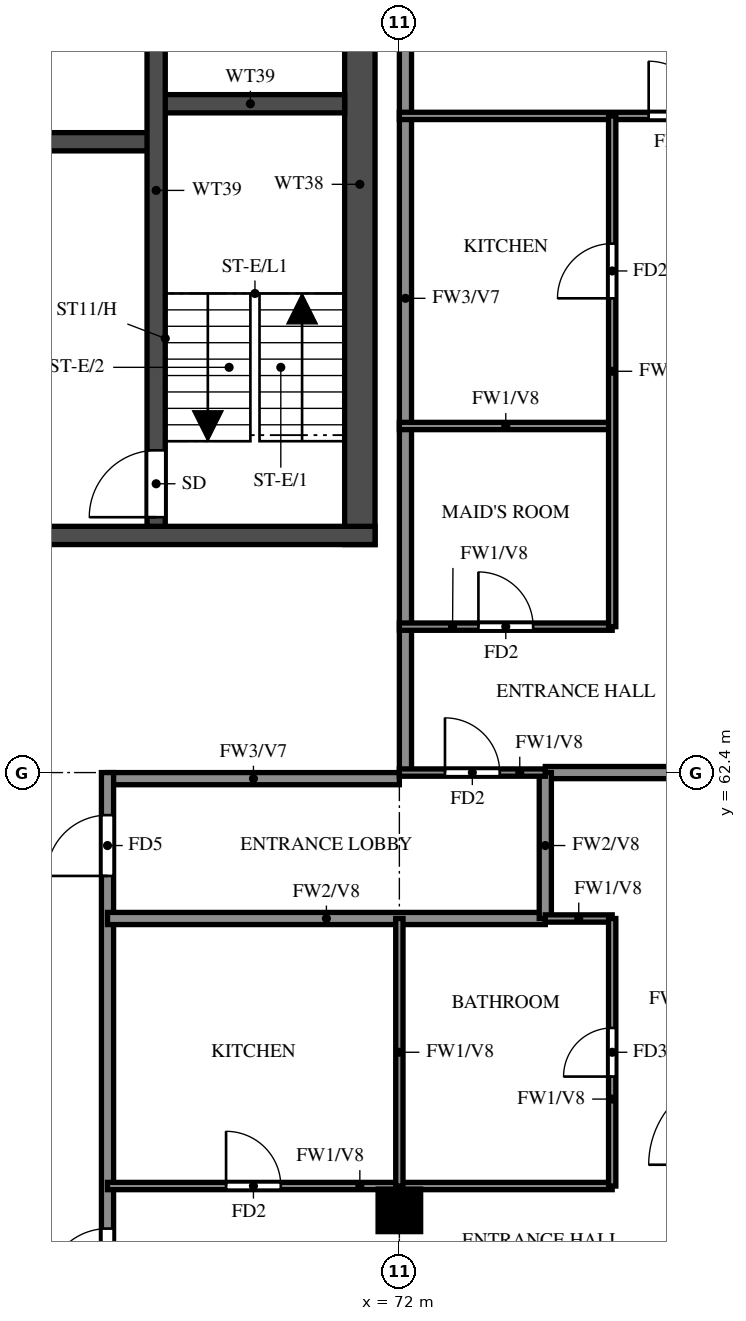
"""IFC4 building model, lengths in metres.
Left out: names, types, materials, properties, quantities, classifications, styles, units other than length and angle.
Written with IfcOpenShell. Run it as: python <this file> out.ifc"""

import sys

from ifc_helpers import new_model, si_unit, direction, frame, frame_2d, origin, origin_2d, place, context, subcontext, project, spatial, rectangle, extrude, source, transform, mapped, element, fill, save


model = new_model("IFC4")
c1 = context("Model", 3, precision=1e-05, world=origin(), true_north=direction((0.0, 1.0)))
c2 = subcontext(c1, "Body", "Model", "MODEL_VIEW")
j1 = project(units=[si_unit("LENGTHUNIT", "METRE"), si_unit("PLANEANGLEUNIT", "RADIAN")], contexts=[c1])
p1 = place(None, origin())
s1 = spatial("IfcSite", under=j1, at=p1, CompositionType="ELEMENT")
p2 = place(p1, origin())
s2 = spatial("IfcBuilding", under=s1, at=p2, CompositionType="ELEMENT")
p3 = place(p2, frame((0.0, 0.0, 267.5)))
s3 = spatial("IfcBuildingStorey", under=s2, at=p3, CompositionType="ELEMENT", Elevation=267.5)
m1 = source(origin(), c2, "Body", "SweptSolid", [
    extrude(rectangle(XDim=0.7, YDim=0.7, at=origin_2d()), origin(), (0.0, 0.0, 1.0), 3.099),
])
p4 = place(p3, frame((72.0, 55.2, 0.0), z_axis=(0.0, 0.0, 1.0), x_axis=(1.0, 0.0, 0.0)))
e1 = element("IfcColumn", 1, at=p4, inside=s3, PredefinedType="COLUMN", context=c2, shape_type="MappedRepresentation", body=[
    mapped(m1, transform((0.0, 0.0, 0.0))),
])
p5 = place(p3, frame((71.35, 66.15, 0.0), z_axis=(0.0, 0.0, 1.0), x_axis=(0.0, 1.0, 0.0)))
e2 = element("IfcWall", 2, at=p5, inside=s3, PredefinedType="SHEAR", context=c2, shape_type="SweptSolid", body=[
    extrude(rectangle(XDim=11.85, YDim=0.5, at=frame_2d((5.925, 0.0))), origin(), (0.0, 0.0, 1.0), 3.099),
])
p6 = place(p3, frame((29.2, 66.3, 0.0), z_axis=(0.0, 0.0, 1.0), x_axis=(1.0, 0.0, 0.0)))
e3 = element("IfcWall", 3, at=p6, inside=s3, PredefinedType="SHEAR", context=c2, shape_type="SweptSolid", body=[
    extrude(rectangle(XDim=42.4, YDim=0.3, at=frame_2d((21.2, 0.0))), origin(), (0.0, 0.0, 1.0), 3.099),
])
p7 = place(p6, frame((1.425, 0.0, 0.0)))
e4 = element("IfcOpeningElement", 4, at=p7, cuts=e3, PredefinedType="OPENING", context=c2, shape_type="SweptSolid", body=[
    extrude(rectangle(XDim=1.1, YDim=2.1, at=frame_2d((0.55, 1.05))), frame((0.0, 0.16, 0.0), z_axis=(0.0, -1.0, 0.0), x_axis=(1.0, 0.0, 0.0)), (0.0, 0.0, 1.0), 0.32),
])
p8 = place(p6, frame((4.2, 0.0, 0.0)))
e5 = element("IfcOpeningElement", 5, at=p8, cuts=e3, PredefinedType="OPENING", context=c2, shape_type="SweptSolid", body=[
    extrude(rectangle(XDim=1.8, YDim=2.1, at=frame_2d((0.9, 1.05))), frame((0.0, 0.16, 0.0), z_axis=(0.0, -1.0, 0.0), x_axis=(1.0, 0.0, 0.0)), (0.0, 0.0, 1.0), 0.32),
])
p9 = place(p3, frame((32.8, 72.775, 0.0), z_axis=(0.0, 0.0, 1.0), x_axis=(1.0, 0.0, 0.0)))
e6 = element("IfcWall", 6, at=p9, inside=s3, PredefinedType="SHEAR", context=c2, shape_type="SweptSolid", body=[
    extrude(rectangle(XDim=35.2, YDim=0.3, at=frame_2d((17.6, 0.0))), origin(), (0.0, 0.0, 1.0), 3.099),
])
p10 = place(p9, frame((19.8, 0.0, 0.0)))
e7 = element("IfcOpeningElement", 7, at=p10, cuts=e6, PredefinedType="OPENING", context=c2, shape_type="SweptSolid", body=[
    extrude(rectangle(XDim=1.1, YDim=2.1, at=frame_2d((0.55, 1.05))), frame((0.0, 0.16, 0.0), z_axis=(0.0, -1.0, 0.0), x_axis=(1.0, 0.0, 0.0)), (0.0, 0.0, 1.0), 0.32),
])
p11 = place(p9, frame((27.725, 0.0, 0.0)))
e8 = element("IfcOpeningElement", 8, at=p11, cuts=e6, PredefinedType="OPENING", context=c2, shape_type="SweptSolid", body=[
    extrude(rectangle(XDim=1.1, YDim=2.1, at=frame_2d((0.55, 1.05))), frame((0.0, 0.16, 0.0), z_axis=(0.0, -1.0, 0.0), x_axis=(1.0, 0.0, 0.0)), (0.0, 0.0, 1.0), 0.32),
])
p12 = place(p9, frame((30.325, 0.0, 0.0)))
e9 = element("IfcOpeningElement", 9, at=p12, cuts=e6, PredefinedType="OPENING", context=c2, shape_type="SweptSolid", body=[
    extrude(rectangle(XDim=1.1, YDim=2.1, at=frame_2d((0.55, 1.05))), frame((0.0, 0.16, 0.0), z_axis=(0.0, -1.0, 0.0), x_axis=(1.0, 0.0, 0.0)), (0.0, 0.0, 1.0), 0.32),
])
p13 = place(p9, frame((3.825, 0.0, 0.0)))
e10 = element("IfcOpeningElement", 10, at=p13, cuts=e6, PredefinedType="OPENING", context=c2, shape_type="SweptSolid", body=[
    extrude(rectangle(XDim=1.1, YDim=2.1, at=frame_2d((0.55, 1.05))), frame((0.0, 0.16, 0.0), z_axis=(0.0, -1.0, 0.0), x_axis=(1.0, 0.0, 0.0)), (0.0, 0.0, 1.0), 0.32),
])
p14 = place(p9, frame((6.575, 0.0, 0.0)))
e11 = element("IfcOpeningElement", 11, at=p14, cuts=e6, PredefinedType="OPENING", context=c2, shape_type="SweptSolid", body=[
    extrude(rectangle(XDim=1.1, YDim=2.1, at=frame_2d((0.55, 1.05))), frame((0.0, 0.16, 0.0), z_axis=(0.0, -1.0, 0.0), x_axis=(1.0, 0.0, 0.0)), (0.0, 0.0, 1.0), 0.32),
])
p15 = place(p9, frame((9.325, 0.0, 0.0)))
e12 = element("IfcOpeningElement", 12, at=p15, cuts=e6, PredefinedType="OPENING", context=c2, shape_type="SweptSolid", body=[
    extrude(rectangle(XDim=1.1, YDim=2.1, at=frame_2d((0.55, 1.05))), frame((0.0, 0.16, 0.0), z_axis=(0.0, -1.0, 0.0), x_axis=(1.0, 0.0, 0.0)), (0.0, 0.0, 1.0), 0.32),
])
p16 = place(p9, frame((12.075, 0.0, 0.0)))
e13 = element("IfcOpeningElement", 13, at=p16, cuts=e6, PredefinedType="OPENING", context=c2, shape_type="SweptSolid", body=[
    extrude(rectangle(XDim=1.1, YDim=2.1, at=frame_2d((0.55, 1.05))), frame((0.0, 0.16, 0.0), z_axis=(0.0, -1.0, 0.0), x_axis=(1.0, 0.0, 0.0)), (0.0, 0.0, 1.0), 0.32),
])
p17 = place(p9, frame((14.825, 0.0, 0.0)))
e14 = element("IfcOpeningElement", 14, at=p17, cuts=e6, PredefinedType="OPENING", context=c2, shape_type="SweptSolid", body=[
    extrude(rectangle(XDim=1.1, YDim=2.1, at=frame_2d((0.55, 1.05))), frame((0.0, 0.16, 0.0), z_axis=(0.0, -1.0, 0.0), x_axis=(1.0, 0.0, 0.0)), (0.0, 0.0, 1.0), 0.32),
])
p18 = place(p9, frame((17.575, 0.0, 0.0)))
e15 = element("IfcOpeningElement", 15, at=p18, cuts=e6, PredefinedType="OPENING", context=c2, shape_type="SweptSolid", body=[
    extrude(rectangle(XDim=1.1, YDim=2.1, at=frame_2d((0.55, 1.05))), frame((0.0, 0.16, 0.0), z_axis=(0.0, -1.0, 0.0), x_axis=(1.0, 0.0, 0.0)), (0.0, 0.0, 1.0), 0.32),
])
p19 = place(p9, frame((0.95, 0.0, 0.0)))
e16 = element("IfcOpeningElement", 16, at=p19, cuts=e6, PredefinedType="OPENING", context=c2, shape_type="SweptSolid", body=[
    extrude(rectangle(XDim=1.1, YDim=2.1, at=frame_2d((0.55, 1.05))), frame((0.0, 0.16, 0.0), z_axis=(0.0, -1.0, 0.0), x_axis=(1.0, 0.0, 0.0)), (0.0, 0.0, 1.0), 0.32),
])
p20 = place(p3, frame((68.0, 73.4, 0.0), z_axis=(0.0, 0.0, 1.0), x_axis=(1.0, 0.0, 0.0)))
e17 = element("IfcWall", 17, at=p20, inside=s3, PredefinedType="SHEAR", context=c2, shape_type="SweptSolid", body=[
    extrude(rectangle(XDim=3.1, YDim=0.3, at=frame_2d((1.55, 0.0))), origin(), (0.0, 0.0, 1.0), 3.099),
])
p21 = place(p3, frame((68.0, 66.45, 0.0), z_axis=(0.0, 0.0, 1.0), x_axis=(0.0, 1.0, 0.0)))
e18 = element("IfcWall", 18, at=p21, inside=s3, PredefinedType="SHEAR", context=c2, shape_type="SweptSolid", body=[
    extrude(rectangle(XDim=11.05, YDim=0.3, at=frame_2d((5.525, 0.0))), origin(), (0.0, 0.0, 1.0), 3.099),
])
p22 = place(p21, frame((0.15, 0.0, 0.0)))
e19 = element("IfcOpeningElement", 19, at=p22, cuts=e18, PredefinedType="OPENING", context=c2, shape_type="SweptSolid", body=[
    extrude(rectangle(XDim=1.1, YDim=2.1, at=frame_2d((0.55, 1.05))), frame((0.0, 0.16, 0.0), z_axis=(0.0, -1.0, 0.0), x_axis=(1.0, 0.0, 0.0)), (0.0, 0.0, 1.0), 0.32),
])
p23 = place(p3, frame((67.2, 62.3, 0.0), z_axis=(0.0, 0.0, 1.0), x_axis=(1.0, 0.0, 0.0)))
e20 = element("IfcWall", 20, at=p23, inside=s3, PredefinedType="SOLIDWALL", context=c2, shape_type="SweptSolid", body=[
    extrude(rectangle(XDim=4.8, YDim=0.2, at=frame_2d((2.4, 0.0))), origin(), (0.0, 0.0, 1.0), 3.099),
])
p24 = place(p3, frame((67.2, 45.6, 0.0), z_axis=(0.0, 0.0, 1.0), x_axis=(0.0, 1.0, 0.0)))
e21 = element("IfcWall", 21, at=p24, inside=s3, PredefinedType="SOLIDWALL", context=c2, shape_type="SweptSolid", body=[
    extrude(rectangle(XDim=16.8, YDim=0.2, at=frame_2d((8.4, 0.0))), origin(), (0.0, 0.0, 1.0), 3.099),
])
p25 = place(p24, frame((8.3, 0.0, 0.0)))
e22 = element("IfcOpeningElement", 22, at=p25, cuts=e21, PredefinedType="OPENING", context=c2, shape_type="SweptSolid", body=[
    extrude(rectangle(XDim=1.0, YDim=2.1, at=frame_2d((0.5, 1.05))), frame((0.0, 0.11, 0.0), z_axis=(0.0, -1.0, 0.0), x_axis=(1.0, 0.0, 0.0)), (0.0, 0.0, 1.0), 0.22),
])
p26 = place(p24, frame((15.1, 0.0, 0.0)))
e23 = element("IfcOpeningElement", 23, at=p26, cuts=e21, PredefinedType="OPENING", context=c2, shape_type="SweptSolid", body=[
    extrude(rectangle(XDim=1.0, YDim=2.1, at=frame_2d((0.5, 1.05))), frame((0.0, 0.11, 0.0), z_axis=(0.0, -1.0, 0.0), x_axis=(1.0, 0.0, 0.0)), (0.0, 0.0, 1.0), 0.22),
])
p27 = place(p24, frame((0.7, 0.0, 0.0)))
e24 = element("IfcOpeningElement", 24, at=p27, cuts=e21, PredefinedType="OPENING", context=c2, shape_type="SweptSolid", body=[
    extrude(rectangle(XDim=1.0, YDim=2.1, at=frame_2d((0.5, 1.05))), frame((0.0, 0.11, 0.0), z_axis=(0.0, -1.0, 0.0), x_axis=(1.0, 0.0, 0.0)), (0.0, 0.0, 1.0), 0.22),
])
p28 = place(p3, frame((72.1, 62.4, 0.0), z_axis=(0.0, 0.0, 1.0), x_axis=(0.0, 1.0, 0.0)))
e25 = element("IfcWall", 25, at=p28, inside=s3, PredefinedType="SOLIDWALL", context=c2, shape_type="SweptSolid", body=[
    extrude(rectangle(XDim=15.6, YDim=0.2, at=frame_2d((7.8, 0.0))), origin(), (0.0, 0.0, 1.0), 3.099),
])
p29 = place(p3, frame((67.2, 60.0, 0.0), z_axis=(0.0, 0.0, 1.0), x_axis=(1.0, 0.0, 0.0)))
e26 = element("IfcWall", 26, at=p29, inside=s3, PredefinedType="SOLIDWALL", context=c2, shape_type="SweptSolid", body=[
    extrude(rectangle(XDim=7.2, YDim=0.2, at=frame_2d((3.6, 0.0))), origin(), (0.0, 0.0, 1.0), 3.099),
])
p30 = place(p3, frame((74.4, 62.4, 0.0), z_axis=(0.0, 0.0, 1.0), x_axis=(1.0, 0.0, 0.0)))
e27 = element("IfcWall", 27, at=p30, inside=s3, PredefinedType="SOLIDWALL", context=c2, shape_type="SweptSolid", body=[
    extrude(rectangle(XDim=7.875, YDim=0.2, at=frame_2d((3.938, 0.0))), origin(), (0.0, 0.0, 1.0), 3.099),
])
p31 = place(p3, frame((74.4, 60.0, 0.0), z_axis=(0.0, 0.0, 1.0), x_axis=(0.0, 1.0, 0.0)))
e28 = element("IfcWall", 28, at=p31, inside=s3, PredefinedType="SOLIDWALL", context=c2, shape_type="SweptSolid", body=[
    extrude(rectangle(XDim=2.4, YDim=0.2, at=frame_2d((1.2, 0.0))), origin(), (0.0, 0.0, 1.0), 3.099),
])
p32 = place(p3, frame((67.2, 55.6, 0.0), z_axis=(0.0, 0.0, 1.0), x_axis=(1.0, 0.0, 0.0)))
e29 = element("IfcWall", 29, at=p32, inside=s3, PredefinedType="PARTITIONING", context=c2, shape_type="SweptSolid", body=[
    extrude(rectangle(XDim=8.3, YDim=0.12, at=frame_2d((4.15, 0.0))), origin(), (0.0, 0.0, 1.0), 3.099),
])
p33 = place(p32, frame((1.95, 0.0, 0.0)))
e30 = element("IfcOpeningElement", 30, at=p33, cuts=e29, PredefinedType="OPENING", context=c2, shape_type="SweptSolid", body=[
    extrude(rectangle(XDim=0.9, YDim=2.1, at=frame_2d((0.45, 1.05))), frame((0.0, 0.07, 0.0), z_axis=(0.0, -1.0, 0.0), x_axis=(1.0, 0.0, 0.0)), (0.0, 0.0, 1.0), 0.14),
])
p34 = place(p3, frame((74.4, 60.0, 0.0), z_axis=(0.0, 0.0, 1.0), x_axis=(1.0, 0.0, 0.0)))
e31 = element("IfcWall", 31, at=p34, inside=s3, PredefinedType="PARTITIONING", context=c2, shape_type="SweptSolid", body=[
    extrude(rectangle(XDim=1.1, YDim=0.12, at=frame_2d((0.55, 0.0))), origin(), (0.0, 0.0, 1.0), 3.099),
])
p35 = place(p3, frame((72.0, 62.4, 0.0), z_axis=(0.0, 0.0, 1.0), x_axis=(1.0, 0.0, 0.0)))
e32 = element("IfcWall", 32, at=p35, inside=s3, PredefinedType="PARTITIONING", context=c2, shape_type="SweptSolid", body=[
    extrude(rectangle(XDim=2.4, YDim=0.12, at=frame_2d((1.2, 0.0))), origin(), (0.0, 0.0, 1.0), 3.099),
])
p36 = place(p35, frame((0.75, 0.0, 0.0)))
e33 = element("IfcOpeningElement", 33, at=p36, cuts=e32, PredefinedType="OPENING", context=c2, shape_type="SweptSolid", body=[
    extrude(rectangle(XDim=0.9, YDim=2.1, at=frame_2d((0.45, 1.05))), frame((0.0, 0.07, 0.0), z_axis=(0.0, -1.0, 0.0), x_axis=(1.0, 0.0, 0.0)), (0.0, 0.0, 1.0), 0.14),
])
p37 = place(p3, frame((72.0, 64.8, 0.0), z_axis=(0.0, 0.0, 1.0), x_axis=(1.0, 0.0, 0.0)))
e34 = element("IfcWall", 34, at=p37, inside=s3, PredefinedType="PARTITIONING", context=c2, shape_type="SweptSolid", body=[
    extrude(rectangle(XDim=3.5, YDim=0.12, at=frame_2d((1.75, 0.0))), origin(), (0.0, 0.0, 1.0), 3.099),
])
p38 = place(p37, frame((1.3, 0.0, 0.0)))
e35 = element("IfcOpeningElement", 35, at=p38, cuts=e34, PredefinedType="OPENING", context=c2, shape_type="SweptSolid", body=[
    extrude(rectangle(XDim=0.9, YDim=2.1, at=frame_2d((0.45, 1.05))), frame((0.0, 0.07, 0.0), z_axis=(0.0, -1.0, 0.0), x_axis=(1.0, 0.0, 0.0)), (0.0, 0.0, 1.0), 0.14),
])
p39 = place(p3, frame((72.0, 68.1, 0.0), z_axis=(0.0, 0.0, 1.0), x_axis=(1.0, 0.0, 0.0)))
e36 = element("IfcWall", 36, at=p39, inside=s3, PredefinedType="PARTITIONING", context=c2, shape_type="SweptSolid", body=[
    extrude(rectangle(XDim=3.5, YDim=0.12, at=frame_2d((1.75, 0.0))), origin(), (0.0, 0.0, 1.0), 3.099),
])
p40 = place(p3, frame((72.0, 73.2, 0.0), z_axis=(0.0, 0.0, 1.0), x_axis=(1.0, 0.0, 0.0)))
e37 = element("IfcWall", 37, at=p40, inside=s3, PredefinedType="PARTITIONING", context=c2, shape_type="SweptSolid", body=[
    extrude(rectangle(XDim=10.275, YDim=0.12, at=frame_2d((5.137, 0.0))), origin(), (0.0, 0.0, 1.0), 3.099),
])
p41 = place(p40, frame((4.1, 0.0, 0.0)))
e38 = element("IfcOpeningElement", 38, at=p41, cuts=e37, PredefinedType="OPENING", context=c2, shape_type="SweptSolid", body=[
    extrude(rectangle(XDim=0.9, YDim=2.1, at=frame_2d((0.45, 1.05))), frame((0.0, 0.07, 0.0), z_axis=(0.0, -1.0, 0.0), x_axis=(1.0, 0.0, 0.0)), (0.0, 0.0, 1.0), 0.14),
])
p42 = place(p3, frame((72.0, 55.6, 0.0), z_axis=(0.0, 0.0, 1.0), x_axis=(0.0, 1.0, 0.0)))
e39 = element("IfcWall", 39, at=p42, inside=s3, PredefinedType="PARTITIONING", context=c2, shape_type="SweptSolid", body=[
    extrude(rectangle(XDim=4.4, YDim=0.12, at=frame_2d((2.2, 0.0))), origin(), (0.0, 0.0, 1.0), 3.099),
])
p43 = place(p3, frame((75.5, 55.6, 0.0), z_axis=(0.0, 0.0, 1.0), x_axis=(0.0, 1.0, 0.0)))
e40 = element("IfcWall", 40, at=p43, inside=s3, PredefinedType="PARTITIONING", context=c2, shape_type="SweptSolid", body=[
    extrude(rectangle(XDim=4.4, YDim=0.12, at=frame_2d((2.2, 0.0))), origin(), (0.0, 0.0, 1.0), 3.099),
])
p44 = place(p43, frame((1.8, 0.0, 0.0)))
e41 = element("IfcOpeningElement", 41, at=p44, cuts=e40, PredefinedType="OPENING", context=c2, shape_type="SweptSolid", body=[
    extrude(rectangle(XDim=0.8, YDim=2.1, at=frame_2d((0.4, 1.05))), frame((0.0, 0.07, 0.0), z_axis=(0.0, -1.0, 0.0), x_axis=(1.0, 0.0, 0.0)), (0.0, 0.0, 1.0), 0.14),
])
p45 = place(p3, frame((75.5, 64.8, 0.0), z_axis=(0.0, 0.0, 1.0), x_axis=(0.0, 1.0, 0.0)))
e42 = element("IfcWall", 42, at=p45, inside=s3, PredefinedType="PARTITIONING", context=c2, shape_type="SweptSolid", body=[
    extrude(rectangle(XDim=8.4, YDim=0.12, at=frame_2d((4.2, 0.0))), origin(), (0.0, 0.0, 1.0), 3.099),
])
p46 = place(p45, frame((5.4, 0.0, 0.0)))
e43 = element("IfcOpeningElement", 43, at=p46, cuts=e42, PredefinedType="OPENING", context=c2, shape_type="SweptSolid", body=[
    extrude(rectangle(XDim=0.9, YDim=2.1, at=frame_2d((0.45, 1.05))), frame((0.0, 0.07, 0.0), z_axis=(0.0, -1.0, 0.0), x_axis=(1.0, 0.0, 0.0)), (0.0, 0.0, 1.0), 0.14),
])
p47 = place(p22, origin())
e44 = element("IfcDoor", 44, at=p47, inside=s3, OperationType="SINGLE_SWING_RIGHT", PredefinedType="DOOR", context=c2, shape_type="SweptSolid", body=[
    extrude(rectangle(XDim=1.1, YDim=2.1, at=frame_2d((0.55, 1.05))), frame((0.0, 0.025, 0.0), z_axis=(0.0, -1.0, 0.0), x_axis=(1.0, 0.0, 0.0)), (0.0, 0.0, 1.0), 0.05),
])
fill(e19, e44)
p48 = place(p25, origin())
e45 = element("IfcDoor", 45, at=p48, inside=s3, OperationType="SINGLE_SWING_RIGHT", PredefinedType="DOOR", context=c2, shape_type="SweptSolid", body=[
    extrude(rectangle(XDim=1.0, YDim=2.1, at=frame_2d((0.5, 1.05))), frame((0.0, 0.025, 0.0), z_axis=(0.0, -1.0, 0.0), x_axis=(1.0, 0.0, 0.0)), (0.0, 0.0, 1.0), 0.05),
])
fill(e22, e45)
p49 = place(p44, origin())
e46 = element("IfcDoor", 46, at=p49, inside=s3, OperationType="SINGLE_SWING_RIGHT", PredefinedType="DOOR", context=c2, shape_type="SweptSolid", body=[
    extrude(rectangle(XDim=0.8, YDim=2.1, at=frame_2d((0.4, 1.05))), frame((0.0, 0.025, 0.0), z_axis=(0.0, -1.0, 0.0), x_axis=(1.0, 0.0, 0.0)), (0.0, 0.0, 1.0), 0.05),
])
fill(e41, e46)
p50 = place(p33, origin())
e47 = element("IfcDoor", 47, at=p50, inside=s3, OperationType="SINGLE_SWING_LEFT", PredefinedType="DOOR", context=c2, shape_type="SweptSolid", body=[
    extrude(rectangle(XDim=0.9, YDim=2.1, at=frame_2d((0.45, 1.05))), frame((0.0, 0.025, 0.0), z_axis=(0.0, -1.0, 0.0), x_axis=(1.0, 0.0, 0.0)), (0.0, 0.0, 1.0), 0.05),
])
fill(e30, e47)
p51 = place(p36, origin())
e48 = element("IfcDoor", 48, at=p51, inside=s3, OperationType="SINGLE_SWING_LEFT", PredefinedType="DOOR", context=c2, shape_type="SweptSolid", body=[
    extrude(rectangle(XDim=0.9, YDim=2.1, at=frame_2d((0.45, 1.05))), frame((0.0, 0.025, 0.0), z_axis=(0.0, -1.0, 0.0), x_axis=(1.0, 0.0, 0.0)), (0.0, 0.0, 1.0), 0.05),
])
fill(e33, e48)
p52 = place(p26, origin())
e49 = element("IfcDoor", 49, at=p52, inside=s3, OperationType="SINGLE_SWING_RIGHT", PredefinedType="DOOR", context=c2, shape_type="SweptSolid", body=[
    extrude(rectangle(XDim=1.0, YDim=2.1, at=frame_2d((0.5, 1.05))), frame((0.0, 0.025, 0.0), z_axis=(0.0, -1.0, 0.0), x_axis=(1.0, 0.0, 0.0)), (0.0, 0.0, 1.0), 0.05),
])
fill(e23, e49)
p53 = place(p41, origin())
e50 = element("IfcDoor", 50, at=p53, inside=s3, OperationType="SINGLE_SWING_LEFT", PredefinedType="DOOR", context=c2, shape_type="SweptSolid", body=[
    extrude(rectangle(XDim=0.9, YDim=2.1, at=frame_2d((0.45, 1.05))), frame((0.0, 0.025, 0.0), z_axis=(0.0, -1.0, 0.0), x_axis=(1.0, 0.0, 0.0)), (0.0, 0.0, 1.0), 0.05),
])
fill(e38, e50)
p54 = place(p38, origin())
e51 = element("IfcDoor", 51, at=p54, inside=s3, OperationType="SINGLE_SWING_LEFT", PredefinedType="DOOR", context=c2, shape_type="SweptSolid", body=[
    extrude(rectangle(XDim=0.9, YDim=2.1, at=frame_2d((0.45, 1.05))), frame((0.0, 0.025, 0.0), z_axis=(0.0, -1.0, 0.0), x_axis=(1.0, 0.0, 0.0)), (0.0, 0.0, 1.0), 0.05),
])
fill(e35, e51)
p55 = place(p46, origin())
e52 = element("IfcDoor", 52, at=p55, inside=s3, OperationType="SINGLE_SWING_RIGHT", PredefinedType="DOOR", context=c2, shape_type="SweptSolid", body=[
    extrude(rectangle(XDim=0.9, YDim=2.1, at=frame_2d((0.45, 1.05))), frame((0.0, 0.025, 0.0), z_axis=(0.0, -1.0, 0.0), x_axis=(1.0, 0.0, 0.0)), (0.0, 0.0, 1.0), 0.05),
])
fill(e43, e52)
save(model, sys.argv[1])
